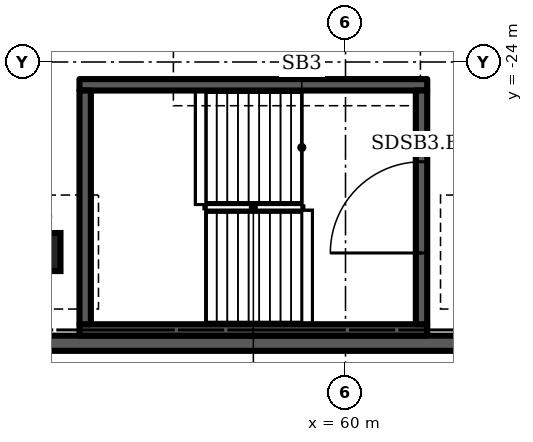
"""IFC4 building model, lengths in metres.
Left out: names, types, materials, properties, quantities, classifications, styles, units other than length and angle.
Written with IfcOpenShell. Run it as: python <this file> out.ifc"""

import sys

from ifc_helpers import new_model, si_unit, direction, frame, frame_2d, origin, origin_2d, place, context, subcontext, project, spatial, rectangle, extrude, element, fill, save


model = new_model("IFC4")
c1 = context("Model", 3, precision=1e-05, world=origin(), true_north=direction((0.0, 1.0)))
c2 = subcontext(c1, "Body", "Model", "MODEL_VIEW")
j1 = project(units=[si_unit("LENGTHUNIT", "METRE"), si_unit("PLANEANGLEUNIT", "RADIAN")], contexts=[c1])
p1 = place(None, origin())
s1 = spatial("IfcSite", under=j1, at=p1, CompositionType="ELEMENT")
p2 = place(p1, origin())
s2 = spatial("IfcBuilding", under=s1, at=p2, CompositionType="ELEMENT")
p3 = place(p2, frame((0.0, 0.0, -14.4)))
s3 = spatial("IfcBuildingStorey", under=s2, at=p3, CompositionType="ELEMENT", Elevation=-14.4)
p4 = place(p3, frame((7.5, -31.4, -0.9), z_axis=(0.0, 0.0, 1.0), x_axis=(1.0, 0.0, 0.0)))
e1 = element("IfcWall", 1, at=p4, inside=s3, PredefinedType="SOLIDWALL", context=c2, shape_type="SweptSolid", body=[
    extrude(rectangle(XDim=75.0, YDim=0.4, at=frame_2d((37.5, 0.0))), origin(), (0.0, 0.0, 1.0), 0.9),
])
p5 = place(p3, frame((52.0, -29.0, 0.0), z_axis=(0.0, 0.0, 1.0), x_axis=(1.0, 0.0, 0.0)))
e2 = element("IfcColumn", 2, at=p5, inside=s3, PredefinedType="COLUMN", context=c2, shape_type="SweptSolid", body=[
    extrude(rectangle(XDim=1.0, YDim=1.0, at=origin_2d()), origin(), (0.0, 0.0, 1.0), 7.2),
])
for number, where, z_axis, x_axis in (
    (3, (53.0, -31.05, 0.0), (0.0, 0.0, 1.0), (1.0, 0.0, 0.0)),
    (4, (53.0, -24.6, 0.0), (0.0, 0.0, 1.0), (1.0, 0.0, 0.0)),
):
    element("IfcWall", number, at=place(p3, frame(where, z_axis=z_axis, x_axis=x_axis)), inside=s3, PredefinedType="SHEAR", context=c2, shape_type="SweptSolid", body=[
        extrude(rectangle(XDim=9.15, YDim=0.3, at=frame_2d((4.575, 0.0))), origin(), (0.0, 0.0, 1.0), 6.9),
    ])
p6 = place(p3, frame((53.15, -30.9, 0.0), z_axis=(0.0, 0.0, 1.0), x_axis=(0.0, 1.0, 0.0)))
e5 = element("IfcWall", 5, at=p6, inside=s3, PredefinedType="SHEAR", context=c2, shape_type="SweptSolid", body=[
    extrude(rectangle(XDim=6.15, YDim=0.3, at=frame_2d((3.075, 0.0))), origin(), (0.0, 0.0, 1.0), 6.9),
])
p7 = place(p3, frame((62.0, -30.9, 0.0), z_axis=(0.0, 0.0, 1.0), x_axis=(0.0, 1.0, 0.0)))
e6 = element("IfcWall", 6, at=p7, inside=s3, PredefinedType="SHEAR", context=c2, shape_type="SweptSolid", body=[
    extrude(rectangle(XDim=6.15, YDim=0.3, at=frame_2d((3.075, 0.0))), origin(), (0.0, 0.0, 1.0), 6.9),
])
p8 = place(p7, frame((1.875, 0.0, 0.0)))
e7 = element("IfcOpeningElement", 7, at=p8, cuts=e6, PredefinedType="OPENING", context=c2, shape_type="SweptSolid", body=[
    extrude(rectangle(XDim=2.4, YDim=2.1, at=frame_2d((1.2, 1.05))), frame((0.0, 0.16, 0.0), z_axis=(0.0, -1.0, 0.0), x_axis=(1.0, 0.0, 0.0)), (0.0, 0.0, 1.0), 0.32),
])
p9 = place(p8, origin())
e8 = element("IfcDoor", 8, at=p9, inside=s3, OperationType="DOUBLE_DOOR_SINGLE_SWING", PredefinedType="DOOR", context=c2, shape_type="SweptSolid", body=[
    extrude(rectangle(XDim=2.4, YDim=2.1, at=frame_2d((1.2, 1.05))), frame((0.0, 0.025, 0.0), z_axis=(0.0, -1.0, 0.0), x_axis=(1.0, 0.0, 0.0)), (0.0, 0.0, 1.0), 0.05),
])
fill(e7, e8)
save(model, sys.argv[1])
